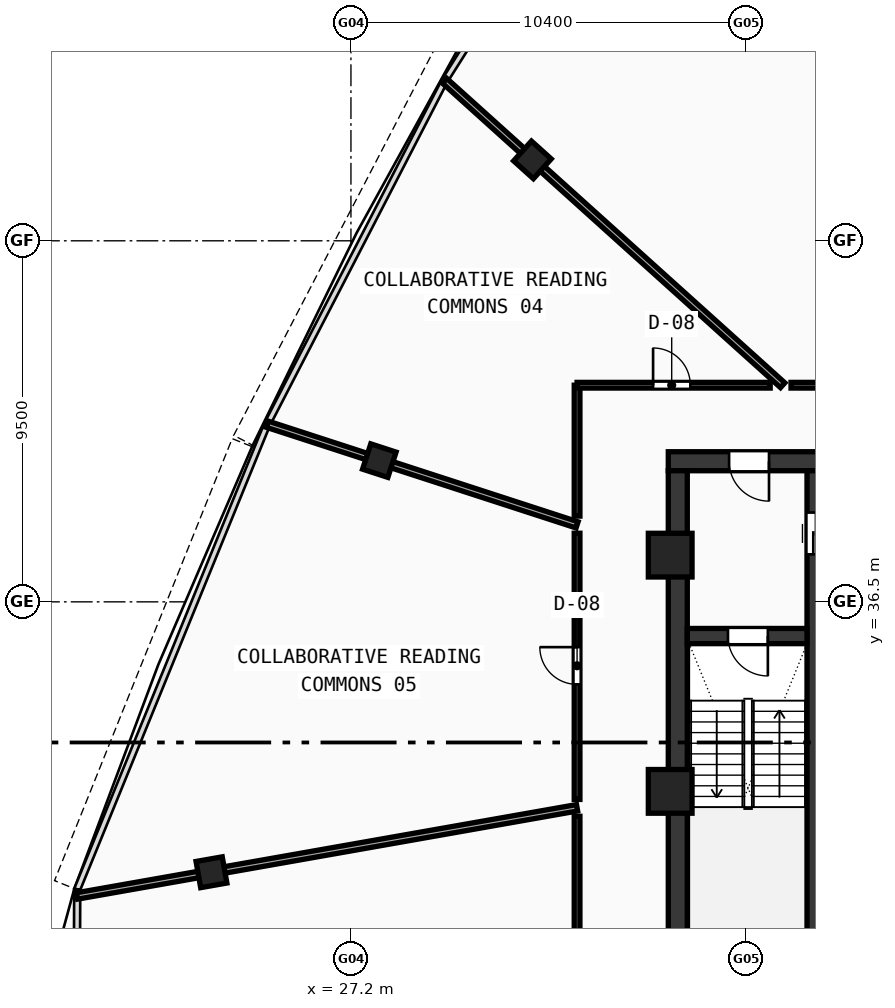
"""IFC4 building model, lengths in metres.
Left out: names, types, materials, properties, quantities, classifications, styles, units other than length and angle.
Written with IfcOpenShell. Run it as: python <this file> out.ifc"""

import sys

from ifc_helpers import new_model, si_unit, direction, frame, frame_2d, origin, origin_with_axes, origin_2d, place, context, subcontext, project, spatial, rectangle, hollow_rectangle, extrude, source, transform, mapped, element, fill, save


model = new_model("IFC4")
c1 = context("Model", 3, precision=1e-05, world=origin(), true_north=direction((0.0, 1.0)))
c2 = subcontext(c1, "Body", "Model", "MODEL_VIEW")
j1 = project(units=[si_unit("LENGTHUNIT", "METRE"), si_unit("PLANEANGLEUNIT", "RADIAN")], contexts=[c1])
p1 = place(None, origin())
s1 = spatial("IfcSite", under=j1, at=p1, CompositionType="ELEMENT")
p2 = place(p1, origin())
s2 = spatial("IfcBuilding", under=s1, at=p2, CompositionType="ELEMENT")
p3 = place(p2, frame((0.0, 0.0, 336.76)))
s3 = spatial("IfcBuildingStorey", under=s2, at=p3, CompositionType="ELEMENT", Elevation=336.76)
p4 = place(p3, frame((35.55, 40.2, 0.0), z_axis=(0.0, 0.0, 1.0), x_axis=(1.0, 0.0, 0.0)))
e1 = element("IfcWall", 1, at=p4, inside=s3, PredefinedType="SHEAR", context=c2, shape_type="SweptSolid", body=[
    extrude(rectangle(XDim=11.25, YDim=0.5, at=frame_2d((5.625, 0.0))), origin(), (0.0, 0.0, 1.0), 3.49),
])
p5 = place(p4, frame((1.6, 0.0, 0.0)))
e2 = element("IfcOpeningElement", 2, at=p5, cuts=e1, PredefinedType="OPENING", context=c2, shape_type="SweptSolid", body=[
    extrude(rectangle(XDim=1.05, YDim=2.1, at=frame_2d((0.525, 1.05))), frame((0.0, 0.26, 0.0), z_axis=(0.0, -1.0, 0.0), x_axis=(1.0, 0.0, 0.0)), (0.0, 0.0, 1.0), 0.52),
])
p6 = place(p3, frame((35.8, 27.75, 0.0), z_axis=(0.0, 0.0, 1.0), x_axis=(0.0, 1.0, 0.0)))
e3 = element("IfcWall", 3, at=p6, inside=s3, PredefinedType="SHEAR", context=c2, shape_type="SweptSolid", body=[
    extrude(rectangle(XDim=12.2, YDim=0.5, at=frame_2d((6.1, 0.0))), origin(), (0.0, 0.0, 1.0), 3.49),
])
p7 = place(p3, frame((39.4, 27.75, 0.0), z_axis=(0.0, 0.0, 1.0), x_axis=(0.0, 1.0, 0.0)))
e4 = element("IfcWall", 4, at=p7, inside=s3, PredefinedType="SHEAR", context=c2, shape_type="SweptSolid", body=[
    extrude(rectangle(XDim=12.2, YDim=0.4, at=frame_2d((6.1, 0.0))), origin(), (0.0, 0.0, 1.0), 3.49),
])
p8 = place(p7, frame((10.0, 0.0, 0.0)))
e5 = element("IfcOpeningElement", 5, at=p8, cuts=e4, PredefinedType="OPENING", context=c2, shape_type="SweptSolid", body=[
    extrude(rectangle(XDim=1.1, YDim=2.1, at=frame_2d((0.55, 1.05))), frame((0.0, 0.21, 0.0), z_axis=(0.0, -1.0, 0.0), x_axis=(1.0, 0.0, 0.0)), (0.0, 0.0, 1.0), 0.42),
])
p9 = place(p3, frame((36.05, 35.6, 0.0), z_axis=(0.0, 0.0, 1.0), x_axis=(1.0, 0.0, 0.0)))
e6 = element("IfcWall", 6, at=p9, inside=s3, PredefinedType="SHEAR", context=c2, shape_type="SweptSolid", body=[
    extrude(rectangle(XDim=3.15, YDim=0.4, at=frame_2d((1.575, 0.0))), origin(), (0.0, 0.0, 1.0), 3.49),
])
p10 = place(p9, frame((1.07, 0.0, 0.0)))
e7 = element("IfcOpeningElement", 7, at=p10, cuts=e6, PredefinedType="OPENING", context=c2, shape_type="SweptSolid", body=[
    extrude(rectangle(XDim=1.05, YDim=2.1, at=frame_2d((0.525, 1.05))), frame((0.0, 0.21, 0.0), z_axis=(0.0, -1.0, 0.0), x_axis=(1.0, 0.0, 0.0)), (0.0, 0.0, 1.0), 0.42),
])
m1 = source(origin(), c2, "Body", "SweptSolid", [
    extrude(hollow_rectangle(XDim=1.15, YDim=1.15, WallThickness=0.048, at=origin_2d()), origin(), (0.0, 0.0, 1.0), 3.75),
])
for number, where, z_axis, x_axis in (
    (8, (35.6, 37.729, -0.26), (0.0, 0.0, 1.0), (1.0, 0.0, 0.0)),
    (9, (35.6, 31.513, -0.26), (0.0, 0.0, 1.0), (1.0, 0.0, 0.0)),
):
    element("IfcColumn", number, at=place(p3, frame(where, z_axis=z_axis, x_axis=x_axis)), inside=s3, PredefinedType="COLUMN", context=c2, shape_type="MappedRepresentation", body=[
        mapped(m1, transform((0.0, 0.0, 0.0), scale=1.0)),
    ])
m2 = source(origin(), c2, "Body", "SweptSolid", [
    extrude(hollow_rectangle(XDim=0.7, YDim=0.7, WallThickness=0.026, at=origin_2d()), origin(), (0.0, 0.0, 1.0), 3.75),
])
for number, where, z_axis, x_axis in (
    (10, (31.975, 48.129, -0.26), (0.0, 0.0, 1.0), (-0.669, -0.743, 0.0)),
    (11, (27.947, 40.216, -0.26), (0.0, 0.0, 1.0), (-0.309, -0.951, 0.0)),
    (12, (23.53, 29.385, -0.26), (0.0, 0.0, 1.0), (0.174, -0.985, 0.0)),
):
    element("IfcColumn", number, at=place(p3, frame(where, z_axis=z_axis, x_axis=x_axis)), inside=s3, PredefinedType="COLUMN", context=c2, shape_type="MappedRepresentation", body=[
        mapped(m2, transform((0.0, 0.0, 0.0), scale=1.0)),
    ])
p11 = place(p3, frame((38.56, 42.2, 0.0), z_axis=(0.0, 0.0, 1.0), x_axis=(-0.743141978473, 0.669133768264, 0.0)))
e13 = element("IfcWall", 13, at=p11, inside=s3, PredefinedType="PARTITIONING", context=c2, shape_type="SweptSolid", body=[
    extrude(rectangle(XDim=11.968, YDim=0.17, at=frame_2d((5.984, 0.0))), origin(), (0.0, 0.0, 1.0), 2.89),
])
p12 = place(p3, frame((33.15, 38.525, 0.0), z_axis=(0.0, 0.0, 1.0), x_axis=(-0.951059599238, 0.309007505891, 0.0)))
e14 = element("IfcWall", 14, at=p12, inside=s3, PredefinedType="PARTITIONING", context=c2, shape_type="SweptSolid", body=[
    extrude(rectangle(XDim=8.572, YDim=0.17, at=frame_2d((4.286, 0.0))), origin(), (0.0, 0.0, 1.0), 2.89),
])
p13 = place(p3, frame((33.15, 31.082, 0.0), z_axis=(0.0, 0.0, 1.0), x_axis=(-0.984808938627, -0.173641453575, 0.0)))
e15 = element("IfcWall", 15, at=p13, inside=s3, PredefinedType="PARTITIONING", context=c2, shape_type="SweptSolid", body=[
    extrude(rectangle(XDim=13.358, YDim=0.17, at=frame_2d((6.679, 0.0))), origin(), (0.0, 0.0, 1.0), 2.89),
])
p14 = place(p3, frame((33.15, 24.9, 0.0), z_axis=(0.0, 0.0, 1.0), x_axis=(0.0, 1.0, 0.0)))
e16 = element("IfcWall", 16, at=p14, inside=s3, PredefinedType="PARTITIONING", context=c2, shape_type="SweptSolid", body=[
    extrude(rectangle(XDim=5.958, YDim=0.15, at=frame_2d((2.979, 0.0))), origin(), (0.0, 0.0, 1.0), 2.89),
])
p15 = place(p3, frame((33.15, 31.301, 0.0), z_axis=(0.0, 0.0, 1.0), x_axis=(0.0, 1.0, 0.0)))
e17 = element("IfcWall", 17, at=p15, inside=s3, PredefinedType="PARTITIONING", context=c2, shape_type="SweptSolid", body=[
    extrude(rectangle(XDim=7.004, YDim=0.15, at=frame_2d((3.502, 0.0))), origin(), (0.0, 0.0, 1.0), 3.49),
])
p16 = place(p15, frame((3.027, 0.0, 0.0)))
e18 = element("IfcOpeningElement", 18, at=p16, cuts=e17, PredefinedType="OPENING", context=c2, shape_type="SweptSolid", body=[
    extrude(rectangle(XDim=0.98, YDim=2.12, at=frame_2d((0.49, 1.06))), frame((0.0, 0.085, 0.0), z_axis=(0.0, -1.0, 0.0), x_axis=(1.0, 0.0, 0.0)), (0.0, 0.0, 1.0), 0.17),
])
p17 = place(p3, frame((33.15, 38.756, 0.0), z_axis=(0.0, 0.0, 1.0), x_axis=(0.0, 1.0, 0.0)))
e19 = element("IfcWall", 19, at=p17, inside=s3, PredefinedType="PARTITIONING", context=c2, shape_type="SweptSolid", body=[
    extrude(rectangle(XDim=3.444, YDim=0.15, at=frame_2d((1.722, 0.0))), origin(), (0.0, 0.0, 1.0), 3.14),
])
p18 = place(p3, frame((33.15, 42.2, 0.0), z_axis=(0.0, 0.0, 1.0), x_axis=(1.0, 0.0, 0.0)))
e20 = element("IfcWall", 20, at=p18, inside=s3, PredefinedType="PARTITIONING", context=c2, shape_type="SweptSolid", body=[
    extrude(rectangle(XDim=5.081, YDim=0.15, at=frame_2d((2.541, 0.0))), origin(), (0.0, 0.0, 1.0), 3.14),
])
p19 = place(p18, frame((2.0, 0.0, 0.0)))
e21 = element("IfcOpeningElement", 21, at=p19, cuts=e20, PredefinedType="OPENING", context=c2, shape_type="SweptSolid", body=[
    extrude(rectangle(XDim=0.98, YDim=2.12, at=frame_2d((0.49, 1.06))), frame((0.0, 0.085, 0.0), z_axis=(0.0, -1.0, 0.0), x_axis=(1.0, 0.0, 0.0)), (0.0, 0.0, 1.0), 0.17),
])
p20 = place(p3, frame((38.78, 42.2, 0.0), z_axis=(0.0, 0.0, 1.0), x_axis=(1.0, 0.0, 0.0)))
e22 = element("IfcWall", 22, at=p20, inside=s3, PredefinedType="PARTITIONING", context=c2, shape_type="SweptSolid", body=[
    extrude(rectangle(XDim=3.22, YDim=0.15, at=frame_2d((1.61, 0.0))), origin(), (0.0, 0.0, 1.0), 2.89),
])
m3 = source(origin(), c2, "Body", "SweptSolid", [
    extrude(rectangle(XDim=1.05, YDim=2.1, at=frame_2d((0.525, 1.05))), frame((0.0, 0.025, 0.0), z_axis=(0.0, -1.0, 0.0), x_axis=(1.0, 0.0, 0.0)), (0.0, 0.0, 1.0), 0.05),
])
p21 = place(p10, frame((1.05, 0.0, 0.0), z_axis=(0.0, 0.0, 1.0), x_axis=(-1.0, 0.0, 0.0)))
e23 = element("IfcDoor", 23, at=p21, inside=s3, OperationType="SINGLE_SWING_LEFT", PredefinedType="DOOR", context=c2, shape_type="MappedRepresentation", body=[
    mapped(m3, transform((0.0, 0.0, 0.0), scale=1.0)),
])
fill(e7, e23)
p22 = place(p5, frame((1.05, 0.0, 0.0), z_axis=(0.0, 0.0, 1.0), x_axis=(-1.0, 0.0, 0.0)))
e24 = element("IfcDoor", 24, at=p22, inside=s3, OperationType="SINGLE_SWING_LEFT", PredefinedType="DOOR", context=c2, shape_type="MappedRepresentation", body=[
    mapped(m3, transform((0.0, 0.0, 0.0), scale=1.0)),
])
fill(e2, e24)
m4 = source(origin(), c2, "Body", "SweptSolid", [
    extrude(rectangle(XDim=1.1, YDim=2.1, at=frame_2d((0.55, 1.05))), frame((0.0, 0.025, 0.0), z_axis=(0.0, -1.0, 0.0), x_axis=(1.0, 0.0, 0.0)), (0.0, 0.0, 1.0), 0.05),
])
p23 = place(p8, frame((1.1, 0.0, 0.0), z_axis=(0.0, 0.0, 1.0), x_axis=(-1.0, 0.0, 0.0)))
e25 = element("IfcDoor", 25, at=p23, inside=s3, OperationType="DOUBLE_DOOR_SLIDING", PredefinedType="DOOR", context=c2, shape_type="MappedRepresentation", body=[
    mapped(m4, transform((0.0, 0.0, 0.0), scale=1.0)),
])
fill(e5, e25)
m5 = source(origin(), c2, "Body", "SweptSolid", [
    extrude(rectangle(XDim=0.98, YDim=2.12, at=frame_2d((0.49, 1.06))), frame((0.0, 0.025, 0.0), z_axis=(0.0, -1.0, 0.0), x_axis=(1.0, 0.0, 0.0)), (0.0, 0.0, 1.0), 0.05),
])
p24 = place(p19, origin_with_axes())
e26 = element("IfcDoor", 26, at=p24, inside=s3, OperationType="SINGLE_SWING_LEFT", PredefinedType="DOOR", context=c2, shape_type="MappedRepresentation", body=[
    mapped(m5, transform((0.0, 0.0, 0.0), scale=1.0)),
])
fill(e21, e26)
p25 = place(p16, origin_with_axes())
e27 = element("IfcDoor", 27, at=p25, inside=s3, OperationType="SINGLE_SWING_RIGHT", PredefinedType="DOOR", context=c2, shape_type="MappedRepresentation", body=[
    mapped(m5, transform((0.0, 0.0, 0.0), scale=1.0)),
])
fill(e18, e27)
save(model, sys.argv[1])
